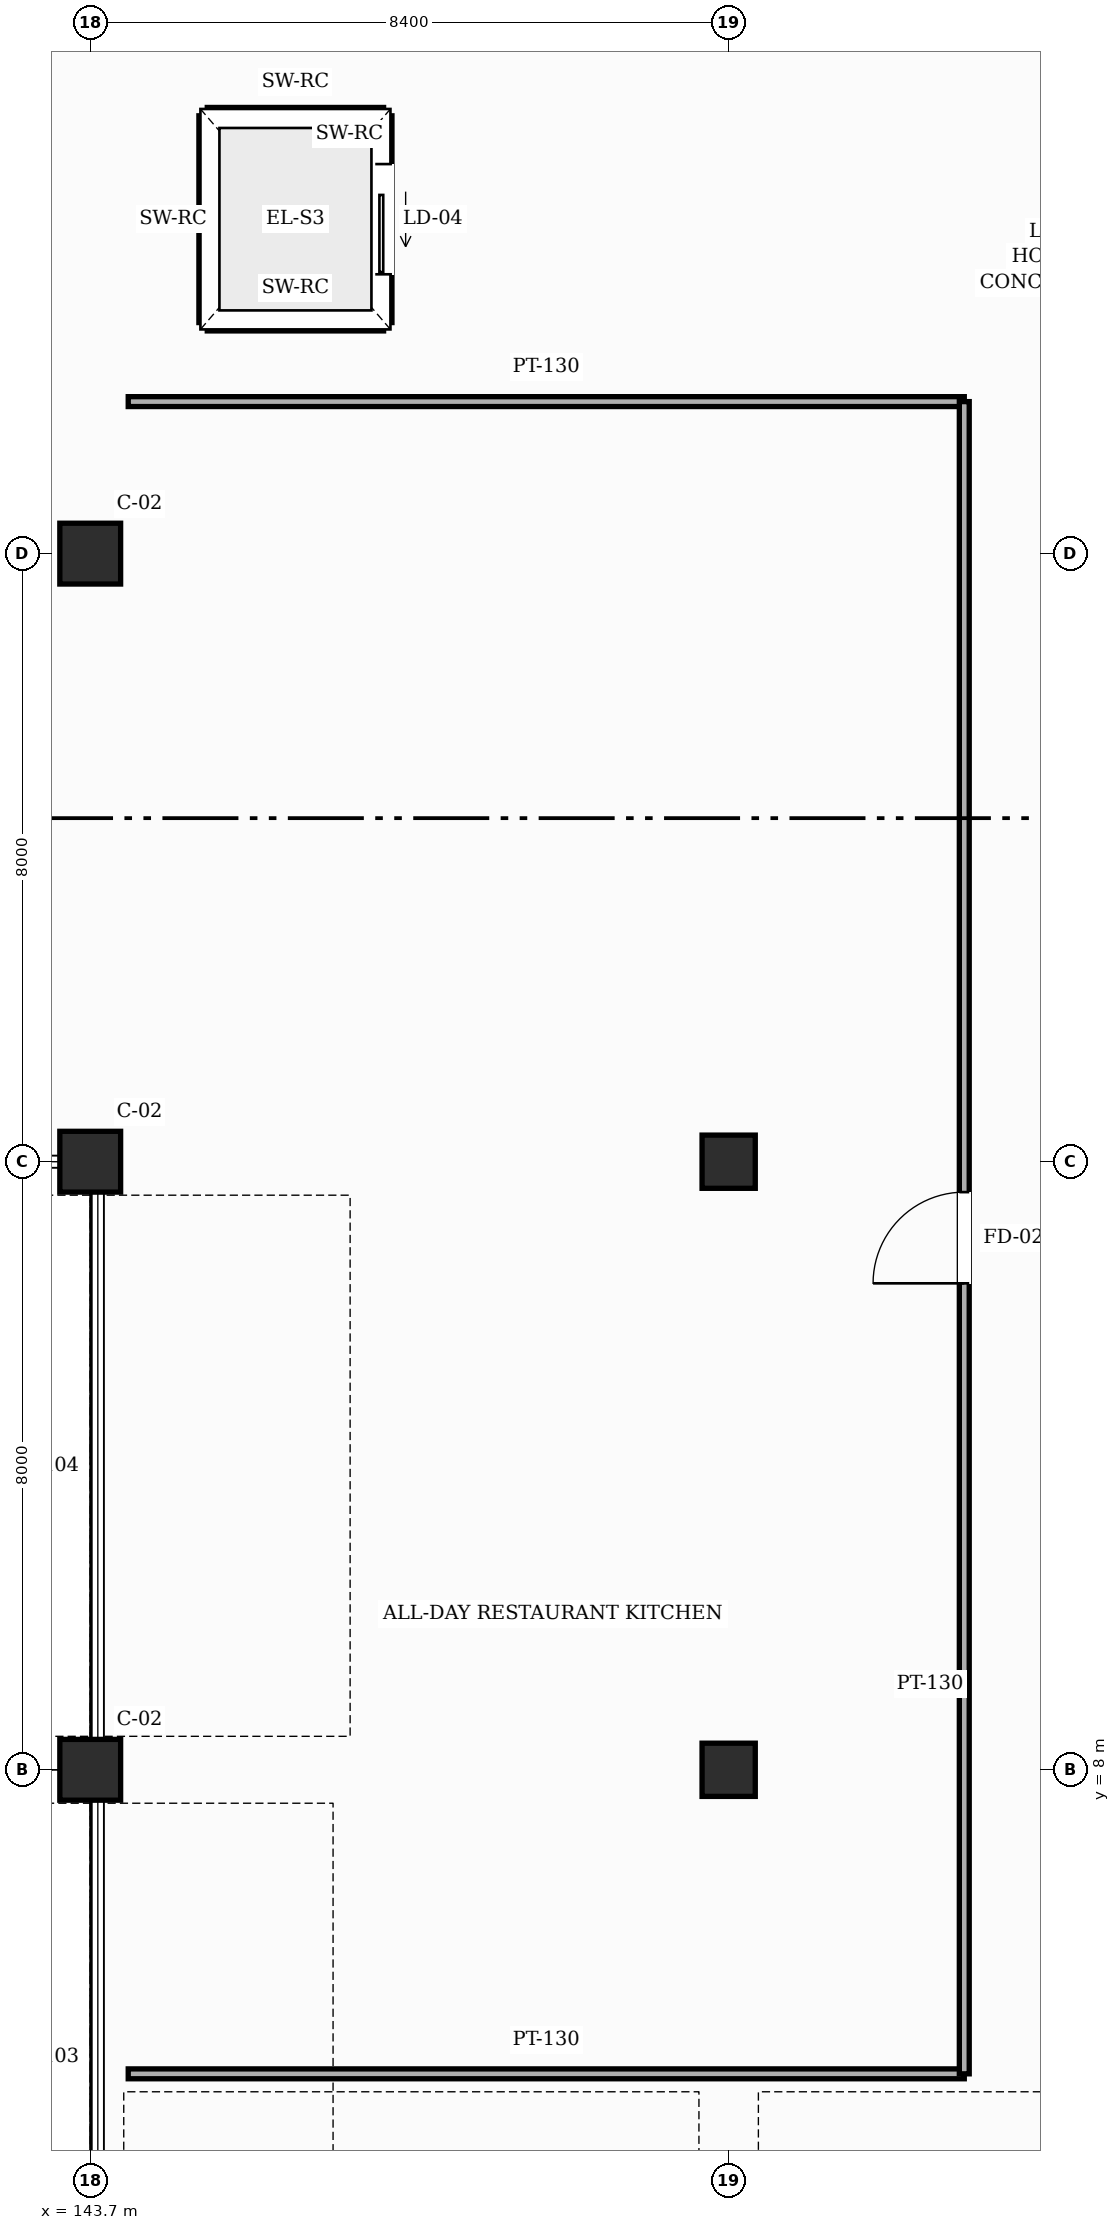
"""IFC4 building model, lengths in metres.
Left out: names, types, materials, properties, quantities, classifications, styles, units other than length and angle.
Written with IfcOpenShell. Run it as: python <this file> out.ifc"""

import sys

from ifc_helpers import new_model, si_unit, direction, frame, frame_2d, origin, origin_2d, place, context, subcontext, project, spatial, rectangle, hollow_rectangle, extrude, element, fill, save


model = new_model("IFC4")
c1 = context("Model", 3, precision=1e-05, world=origin(), true_north=direction((0.0, 1.0)))
c2 = subcontext(c1, "Body", "Model", "MODEL_VIEW")
j1 = project(units=[si_unit("LENGTHUNIT", "METRE"), si_unit("PLANEANGLEUNIT", "RADIAN")], contexts=[c1])
p1 = place(None, origin())
s1 = spatial("IfcSite", under=j1, at=p1, CompositionType="ELEMENT")
p2 = place(p1, origin())
s2 = spatial("IfcBuilding", under=s1, at=p2, CompositionType="ELEMENT")
p3 = place(p2, origin())
s3 = spatial("IfcBuildingStorey", under=s2, at=p3, CompositionType="ELEMENT", Elevation=0.0)
for number, where, z_axis, x_axis in (
    (1, (143.7, 8.0, 0.0), (0.0, 0.0, 1.0), (1.0, 0.0, 0.0)),
    (2, (143.7, 16.0, 0.0), (0.0, 0.0, 1.0), (1.0, 0.0, 0.0)),
    (3, (143.7, 24.0, 0.0), (0.0, 0.0, 1.0), (1.0, 0.0, 0.0)),
):
    element("IfcColumn", number, at=place(p3, frame(where, z_axis=z_axis, x_axis=x_axis)), inside=s3, PredefinedType="COLUMN", context=c2, shape_type="SweptSolid", body=[
        extrude(hollow_rectangle(XDim=0.8, YDim=0.8, WallThickness=0.032, InnerFilletRadius=0.032, OuterFilletRadius=0.064, at=origin_2d()), origin(), (0.0, 0.0, 1.0), 5.4),
    ])
for number, where, z_axis, x_axis in (
    (4, (152.1, 8.0, 0.0), (0.0, 0.0, 1.0), (1.0, 0.0, 0.0)),
    (5, (152.1, 16.0, 0.0), (0.0, 0.0, 1.0), (1.0, 0.0, 0.0)),
):
    element("IfcColumn", number, at=place(p3, frame(where, z_axis=z_axis, x_axis=x_axis)), inside=s3, PredefinedType="COLUMN", context=c2, shape_type="SweptSolid", body=[
        extrude(hollow_rectangle(XDim=0.7, YDim=0.7, WallThickness=0.028, InnerFilletRadius=0.028, OuterFilletRadius=0.056, at=origin_2d()), origin(), (0.0, 0.0, 1.0), 5.4),
    ])
for number, where, z_axis, x_axis in (
    (6, (145.24, 29.76, 0.0), (0.0, 0.0, 1.0), (1.0, 0.0, 0.0)),
    (7, (145.24, 27.04, 0.0), (0.0, 0.0, 1.0), (1.0, 0.0, 0.0)),
):
    element("IfcWall", number, at=place(p3, frame(where, z_axis=z_axis, x_axis=x_axis)), inside=s3, PredefinedType="SHEAR", context=c2, shape_type="SweptSolid", body=[
        extrude(rectangle(XDim=2.32, YDim=0.22, at=frame_2d((1.16, 0.0))), origin(), (0.0, 0.0, 1.0), 5.15),
    ])
p4 = place(p3, frame((147.56, 27.04, 0.0), z_axis=(0.0, 0.0, 1.0), x_axis=(0.0, 1.0, 0.0)))
e8 = element("IfcWall", 8, at=p4, inside=s3, PredefinedType="SHEAR", context=c2, shape_type="SweptSolid", body=[
    extrude(rectangle(XDim=2.72, YDim=0.22, at=frame_2d((1.36, 0.0))), origin(), (0.0, 0.0, 1.0), 5.15),
])
p5 = place(p4, frame((0.635, 0.0, 0.0)))
e9 = element("IfcOpeningElement", 9, at=p5, cuts=e8, PredefinedType="OPENING", context=c2, shape_type="SweptSolid", body=[
    extrude(rectangle(XDim=1.45, YDim=2.35, at=frame_2d((0.725, 1.175))), frame((0.0, 0.12, 0.0), z_axis=(0.0, -1.0, 0.0), x_axis=(1.0, 0.0, 0.0)), (0.0, 0.0, 1.0), 0.24),
])
p6 = place(p3, frame((145.24, 27.04, 0.0), z_axis=(0.0, 0.0, 1.0), x_axis=(0.0, 1.0, 0.0)))
e10 = element("IfcWall", 10, at=p6, inside=s3, PredefinedType="SHEAR", context=c2, shape_type="SweptSolid", body=[
    extrude(rectangle(XDim=2.72, YDim=0.22, at=frame_2d((1.36, 0.0))), origin(), (0.0, 0.0, 1.0), 5.15),
])
p7 = place(p3, frame((144.2, 4.0, 0.0), z_axis=(0.0, 0.0, 1.0), x_axis=(1.0, 0.0, 0.0)))
e11 = element("IfcWall", 11, at=p7, inside=s3, PredefinedType="PARTITIONING", context=c2, shape_type="SweptSolid", body=[
    extrude(rectangle(XDim=11.0, YDim=0.13, at=frame_2d((5.5, 0.0))), origin(), (0.0, 0.0, 1.0), 4.725),
])
p8 = place(p3, frame((144.2, 26.0, 0.0), z_axis=(0.0, 0.0, 1.0), x_axis=(1.0, 0.0, 0.0)))
e12 = element("IfcWall", 12, at=p8, inside=s3, PredefinedType="PARTITIONING", context=c2, shape_type="SweptSolid", body=[
    extrude(rectangle(XDim=11.0, YDim=0.13, at=frame_2d((5.5, 0.0))), origin(), (0.0, 0.0, 1.0), 5.135),
])
p9 = place(p3, frame((155.2, 4.0, 0.0), z_axis=(0.0, 0.0, 1.0), x_axis=(0.0, 1.0, 0.0)))
e13 = element("IfcWall", 13, at=p9, inside=s3, PredefinedType="PARTITIONING", context=c2, shape_type="SweptSolid", body=[
    extrude(rectangle(XDim=22.0, YDim=0.13, at=frame_2d((11.0, 0.0))), origin(), (0.0, 0.0, 1.0), 5.135),
])
p10 = place(p9, frame((10.4, 0.0, 0.0)))
e14 = element("IfcOpeningElement", 14, at=p10, cuts=e13, PredefinedType="OPENING", context=c2, shape_type="SweptSolid", body=[
    extrude(rectangle(XDim=1.2, YDim=2.2, at=frame_2d((0.6, 1.1))), frame((0.0, 0.075, 0.0), z_axis=(0.0, -1.0, 0.0), x_axis=(1.0, 0.0, 0.0)), (0.0, 0.0, 1.0), 0.15),
])
p11 = place(p5, origin())
e15 = element("IfcDoor", 15, at=p11, inside=s3, OperationType="SLIDING_TO_LEFT", PredefinedType="DOOR", context=c2, shape_type="SweptSolid", body=[
    extrude(rectangle(XDim=1.45, YDim=2.35, at=frame_2d((0.725, 1.175))), frame((0.0, 0.025, 0.0), z_axis=(0.0, -1.0, 0.0), x_axis=(1.0, 0.0, 0.0)), (0.0, 0.0, 1.0), 0.05),
])
fill(e9, e15)
p12 = place(p10, origin())
e16 = element("IfcDoor", 16, at=p12, inside=s3, OperationType="SINGLE_SWING_LEFT", PredefinedType="DOOR", context=c2, shape_type="SweptSolid", body=[
    extrude(rectangle(XDim=1.2, YDim=2.2, at=frame_2d((0.6, 1.1))), frame((0.0, 0.025, 0.0), z_axis=(0.0, -1.0, 0.0), x_axis=(1.0, 0.0, 0.0)), (0.0, 0.0, 1.0), 0.05),
])
fill(e14, e16)
save(model, sys.argv[1])
